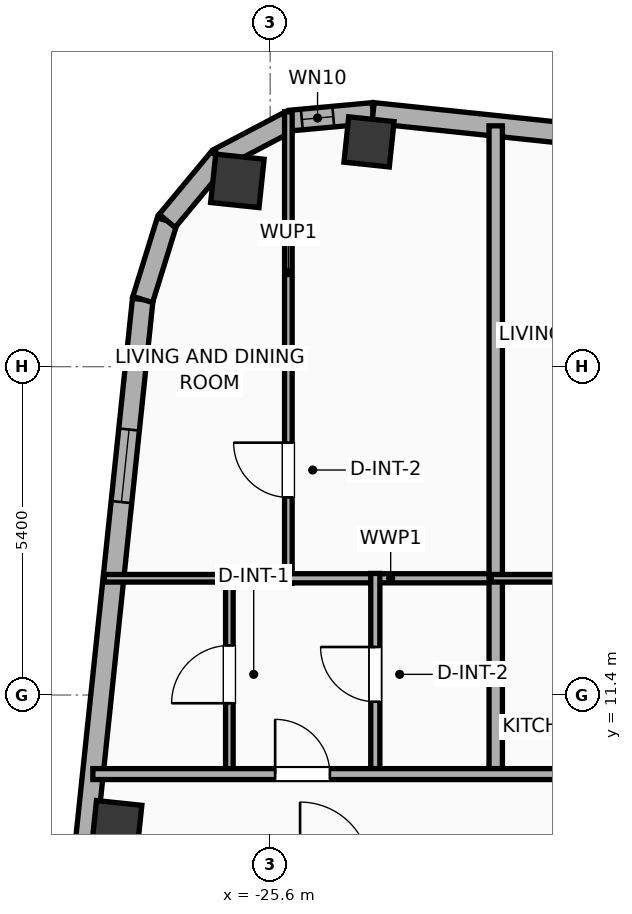
"""IFC4 building model, lengths in metres.
Left out: names, types, materials, properties, quantities, classifications, styles, units other than length and angle.
Written with IfcOpenShell. Run it as: python <this file> out.ifc"""

import sys

from ifc_helpers import new_model, si_unit, direction, frame, frame_2d, origin, origin_2d, place, context, subcontext, project, spatial, rectangle, hollow_rectangle, hollow_circle, extrude, element, fill, save


model = new_model("IFC4")
c1 = context("Model", 3, precision=1e-05, world=origin(), true_north=direction((0.0, 1.0)))
c2 = subcontext(c1, "Body", "Model", "MODEL_VIEW")
j1 = project(units=[si_unit("LENGTHUNIT", "METRE"), si_unit("PLANEANGLEUNIT", "RADIAN")], contexts=[c1])
p1 = place(None, origin())
s1 = spatial("IfcSite", under=j1, at=p1, CompositionType="ELEMENT")
p2 = place(p1, origin())
s2 = spatial("IfcBuilding", under=s1, at=p2, CompositionType="ELEMENT")
p3 = place(p2, frame((0.0, 0.0, 299.0)))
s3 = spatial("IfcBuildingStorey", under=s2, at=p3, CompositionType="ELEMENT", Elevation=299.0)
p4 = place(p3, frame((-23.975, 20.497, 0.0), z_axis=(0.0, 0.0, 1.0), x_axis=(0.994521895368, -0.104528463268, 0.0)))
e1 = element("IfcColumn", 1, at=p4, inside=s3, PredefinedType="COLUMN", context=c2, shape_type="SweptSolid", body=[
    extrude(hollow_rectangle(XDim=0.75, YDim=0.75, WallThickness=0.025, at=origin_2d()), origin(), (0.0, 0.0, 1.0), 3.9),
])
p5 = place(p3, frame((-26.139, 19.855, 0.0), z_axis=(0.0, 0.0, 1.0), x_axis=(0.994521895368, -0.104528463268, 0.0)))
e2 = element("IfcColumn", 2, at=p5, inside=s3, PredefinedType="COLUMN", context=c2, shape_type="SweptSolid", body=[
    extrude(hollow_circle(Radius=0.4, WallThickness=0.028, at=origin_2d()), origin(), (0.0, 0.0, 1.0), 3.9),
])
p6 = place(p3, frame((-28.123, 9.252, 0.0), z_axis=(0.0, 0.0, 1.0), x_axis=(0.994521895368, -0.104528463268, 0.0)))
e3 = element("IfcColumn", 3, at=p6, inside=s3, PredefinedType="COLUMN", context=c2, shape_type="SweptSolid", body=[
    extrude(hollow_rectangle(XDim=0.75, YDim=0.75, WallThickness=0.025, at=origin_2d()), origin(), (0.0, 0.0, 1.0), 3.9),
])
p7 = place(p3, frame((-30.87, -12.296, 0.0), z_axis=(0.0, 0.0, 1.0), x_axis=(0.104533282919, 0.994521388791, 0.0)))
e4 = element("IfcWall", 4, at=p7, inside=s3, PredefinedType="ELEMENTEDWALL", context=c2, shape_type="SweptSolid", body=[
    extrude(rectangle(XDim=30.366, YDim=0.34, at=frame_2d((15.183, 0.0))), origin(), (0.0, 0.0, 1.0), 3.635),
])
p8 = place(p7, frame((5.442, 0.0, 0.65)))
e5 = element("IfcOpeningElement", 5, at=p8, cuts=e4, PredefinedType="OPENING", context=c2, shape_type="SweptSolid", body=[
    extrude(rectangle(XDim=2.6, YDim=2.45, at=frame_2d((1.3, 1.225))), frame((0.0, 0.18, 0.0), z_axis=(0.0, -1.0, 0.0), x_axis=(1.0, 0.0, 0.0)), (0.0, 0.0, 1.0), 0.36),
])
p9 = place(p7, frame((27.017, 0.0, 0.75)))
e6 = element("IfcOpeningElement", 6, at=p9, cuts=e4, PredefinedType="OPENING", context=c2, shape_type="SweptSolid", body=[
    extrude(rectangle(XDim=1.2, YDim=2.05, at=frame_2d((0.6, 1.025))), frame((0.0, 0.18, 0.0), z_axis=(0.0, -1.0, 0.0), x_axis=(1.0, 0.0, 0.0)), (0.0, 0.0, 1.0), 0.36),
])
p10 = place(p7, frame((16.135, 0.0, 0.75)))
e7 = element("IfcOpeningElement", 7, at=p10, cuts=e4, PredefinedType="OPENING", context=c2, shape_type="SweptSolid", body=[
    extrude(rectangle(XDim=1.2, YDim=2.05, at=frame_2d((0.6, 1.025))), frame((0.0, 0.18, 0.0), z_axis=(0.0, -1.0, 0.0), x_axis=(1.0, 0.0, 0.0)), (0.0, 0.0, 1.0), 0.36),
])
p11 = place(p3, frame((-27.696, 17.905, 0.0), z_axis=(0.0, 0.0, 1.0), x_axis=(0.296416228123, 0.955058856671, 0.0)))
e8 = element("IfcWall", 8, at=p11, inside=s3, PredefinedType="ELEMENTEDWALL", context=c2, shape_type="SweptSolid", body=[
    extrude(rectangle(XDim=1.354, YDim=0.34, at=frame_2d((0.677, 0.0))), origin(), (0.0, 0.0, 1.0), 3.635),
])
p12 = place(p3, frame((-27.294, 19.198, 0.0), z_axis=(0.0, 0.0, 1.0), x_axis=(0.639501603217, 0.768789762863, 0.0)))
e9 = element("IfcWall", 9, at=p12, inside=s3, PredefinedType="ELEMENTEDWALL", context=c2, shape_type="SweptSolid", body=[
    extrude(rectangle(XDim=1.337, YDim=0.34, at=frame_2d((0.668, 0.0))), origin(), (0.0, 0.0, 1.0), 3.635),
])
p13 = place(p3, frame((-26.439, 20.226, 0.0), z_axis=(0.0, 0.0, 1.0), x_axis=(0.884922182678, 0.465738908193, 0.0)))
e10 = element("IfcWall", 10, at=p13, inside=s3, PredefinedType="ELEMENTEDWALL", context=c2, shape_type="SweptSolid", body=[
    extrude(rectangle(XDim=1.337, YDim=0.34, at=frame_2d((0.668, 0.0))), origin(), (0.0, 0.0, 1.0), 3.635),
])
p14 = place(p3, frame((-25.256, 20.848, 0.0), z_axis=(0.0, 0.0, 1.0), x_axis=(0.995813013343, 0.091413579172, 0.0)))
e11 = element("IfcWall", 11, at=p14, inside=s3, PredefinedType="ELEMENTEDWALL", context=c2, shape_type="SweptSolid", body=[
    extrude(rectangle(XDim=1.354, YDim=0.34, at=frame_2d((0.677, 0.0))), origin(), (0.0, 0.0, 1.0), 3.635),
])
p15 = place(p14, frame((0.177, 0.0, 0.75)))
e12 = element("IfcOpeningElement", 12, at=p15, cuts=e11, PredefinedType="OPENING", context=c2, shape_type="SweptSolid", body=[
    extrude(rectangle(XDim=0.52, YDim=2.05, at=frame_2d((0.26, 1.025))), frame((0.0, 0.18, 0.0), z_axis=(0.0, -1.0, 0.0), x_axis=(1.0, 0.0, 0.0)), (0.0, 0.0, 1.0), 0.36),
])
p16 = place(p3, frame((-23.908, 20.972, 0.0), z_axis=(0.0, 0.0, 1.0), x_axis=(0.994521888554, -0.104528528102, 0.0)))
e13 = element("IfcWall", 13, at=p16, inside=s3, PredefinedType="ELEMENTEDWALL", context=c2, shape_type="SweptSolid", body=[
    extrude(rectangle(XDim=46.766, YDim=0.34, at=frame_2d((23.383, 0.0))), origin(), (0.0, 0.0, 1.0), 3.635),
])
p17 = place(p16, frame((5.644, 0.0, 0.65)))
e14 = element("IfcOpeningElement", 14, at=p17, cuts=e13, PredefinedType="OPENING", context=c2, shape_type="SweptSolid", body=[
    extrude(rectangle(XDim=2.6, YDim=2.45, at=frame_2d((1.3, 1.225))), frame((0.0, 0.18, 0.0), z_axis=(0.0, -1.0, 0.0), x_axis=(1.0, 0.0, 0.0)), (0.0, 0.0, 1.0), 0.36),
])
p18 = place(p16, frame((3.05, 0.0, 0.75)))
e15 = element("IfcOpeningElement", 15, at=p18, cuts=e13, PredefinedType="OPENING", context=c2, shape_type="SweptSolid", body=[
    extrude(rectangle(XDim=1.2, YDim=2.05, at=frame_2d((0.6, 1.025))), frame((0.0, 0.18, 0.0), z_axis=(0.0, -1.0, 0.0), x_axis=(1.0, 0.0, 0.0)), (0.0, 0.0, 1.0), 0.36),
])
p19 = place(p16, frame((9.957, 0.0, 0.75)))
e16 = element("IfcOpeningElement", 16, at=p19, cuts=e13, PredefinedType="OPENING", context=c2, shape_type="SweptSolid", body=[
    extrude(rectangle(XDim=1.2, YDim=2.05, at=frame_2d((0.6, 1.025))), frame((0.0, 0.18, 0.0), z_axis=(0.0, -1.0, 0.0), x_axis=(1.0, 0.0, 0.0)), (0.0, 0.0, 1.0), 0.36),
])
p20 = place(p16, frame((13.05, 0.0, 0.75)))
e17 = element("IfcOpeningElement", 17, at=p20, cuts=e13, PredefinedType="OPENING", context=c2, shape_type="SweptSolid", body=[
    extrude(rectangle(XDim=1.2, YDim=2.05, at=frame_2d((0.6, 1.025))), frame((0.0, 0.18, 0.0), z_axis=(0.0, -1.0, 0.0), x_axis=(1.0, 0.0, 0.0)), (0.0, 0.0, 1.0), 0.36),
])
p21 = place(p16, frame((16.383, 0.0, 0.75)))
e18 = element("IfcOpeningElement", 18, at=p21, cuts=e13, PredefinedType="OPENING", context=c2, shape_type="SweptSolid", body=[
    extrude(rectangle(XDim=1.2, YDim=2.05, at=frame_2d((0.6, 1.025))), frame((0.0, 0.18, 0.0), z_axis=(0.0, -1.0, 0.0), x_axis=(1.0, 0.0, 0.0)), (0.0, 0.0, 1.0), 0.36),
])
p22 = place(p16, frame((19.716, 0.0, 0.75)))
e19 = element("IfcOpeningElement", 19, at=p22, cuts=e13, PredefinedType="OPENING", context=c2, shape_type="SweptSolid", body=[
    extrude(rectangle(XDim=1.2, YDim=2.05, at=frame_2d((0.6, 1.025))), frame((0.0, 0.18, 0.0), z_axis=(0.0, -1.0, 0.0), x_axis=(1.0, 0.0, 0.0)), (0.0, 0.0, 1.0), 0.36),
])
p23 = place(p16, frame((23.195, 0.0, 0.75)))
e20 = element("IfcOpeningElement", 20, at=p23, cuts=e13, PredefinedType="OPENING", context=c2, shape_type="SweptSolid", body=[
    extrude(rectangle(XDim=1.2, YDim=2.05, at=frame_2d((0.6, 1.025))), frame((0.0, 0.18, 0.0), z_axis=(0.0, -1.0, 0.0), x_axis=(1.0, 0.0, 0.0)), (0.0, 0.0, 1.0), 0.36),
])
p24 = place(p16, frame((26.194, 0.0, 0.75)))
e21 = element("IfcOpeningElement", 21, at=p24, cuts=e13, PredefinedType="OPENING", context=c2, shape_type="SweptSolid", body=[
    extrude(rectangle(XDim=1.2, YDim=2.05, at=frame_2d((0.6, 1.025))), frame((0.0, 0.18, 0.0), z_axis=(0.0, -1.0, 0.0), x_axis=(1.0, 0.0, 0.0)), (0.0, 0.0, 1.0), 0.36),
])
p25 = place(p16, frame((30.152, 0.0, 0.75)))
e22 = element("IfcOpeningElement", 22, at=p25, cuts=e13, PredefinedType="OPENING", context=c2, shape_type="SweptSolid", body=[
    extrude(rectangle(XDim=1.2, YDim=2.05, at=frame_2d((0.6, 1.025))), frame((0.0, 0.18, 0.0), z_axis=(0.0, -1.0, 0.0), x_axis=(1.0, 0.0, 0.0)), (0.0, 0.0, 1.0), 0.36),
])
p26 = place(p16, frame((33.631, 0.0, 0.75)))
e23 = element("IfcOpeningElement", 23, at=p26, cuts=e13, PredefinedType="OPENING", context=c2, shape_type="SweptSolid", body=[
    extrude(rectangle(XDim=1.2, YDim=2.05, at=frame_2d((0.6, 1.025))), frame((0.0, 0.18, 0.0), z_axis=(0.0, -1.0, 0.0), x_axis=(1.0, 0.0, 0.0)), (0.0, 0.0, 1.0), 0.36),
])
p27 = place(p16, frame((38.07, 0.0, 0.75)))
e24 = element("IfcOpeningElement", 24, at=p27, cuts=e13, PredefinedType="OPENING", context=c2, shape_type="SweptSolid", body=[
    extrude(rectangle(XDim=1.2, YDim=2.05, at=frame_2d((0.6, 1.025))), frame((0.0, 0.18, 0.0), z_axis=(0.0, -1.0, 0.0), x_axis=(1.0, 0.0, 0.0)), (0.0, 0.0, 1.0), 0.36),
])
p28 = place(p16, frame((40.589, 0.0, 0.75)))
e25 = element("IfcOpeningElement", 25, at=p28, cuts=e13, PredefinedType="OPENING", context=c2, shape_type="SweptSolid", body=[
    extrude(rectangle(XDim=1.2, YDim=2.05, at=frame_2d((0.6, 1.025))), frame((0.0, 0.18, 0.0), z_axis=(0.0, -1.0, 0.0), x_axis=(1.0, 0.0, 0.0)), (0.0, 0.0, 1.0), 0.36),
])
p29 = place(p16, frame((43.789, 0.0, 0.75)))
e26 = element("IfcOpeningElement", 26, at=p29, cuts=e13, PredefinedType="OPENING", context=c2, shape_type="SweptSolid", body=[
    extrude(rectangle(XDim=1.2, YDim=2.05, at=frame_2d((0.6, 1.025))), frame((0.0, 0.18, 0.0), z_axis=(0.0, -1.0, 0.0), x_axis=(1.0, 0.0, 0.0)), (0.0, 0.0, 1.0), 0.36),
])
p30 = place(p3, frame((-25.301, 13.24, 0.0), z_axis=(0.0, 0.0, 1.0), x_axis=(0.0, 1.0, 0.0)))
e27 = element("IfcWall", 27, at=p30, inside=s3, PredefinedType="PARTITIONING", context=c2, shape_type="SweptSolid", body=[
    extrude(rectangle(XDim=7.751, YDim=0.125, at=frame_2d((3.875, 0.0))), origin(), (0.0, 0.0, 1.0), 3.635),
])
p31 = place(p30, frame((1.41, 0.0, 0.0)))
e28 = element("IfcOpeningElement", 28, at=p31, cuts=e27, PredefinedType="OPENING", context=c2, shape_type="SweptSolid", body=[
    extrude(rectangle(XDim=0.9, YDim=2.05, at=frame_2d((0.45, 1.025))), frame((0.0, 0.073, 0.0), z_axis=(0.0, -1.0, 0.0), x_axis=(1.0, 0.0, 0.0)), (0.0, 0.0, 1.0), 0.145),
])
p32 = place(p3, frame((-25.421, 13.32, 0.0), z_axis=(0.0, 0.0, 1.0), x_axis=(1.0, 0.0, 0.0)))
e29 = element("IfcWall", 29, at=p32, inside=s3, PredefinedType="PLUMBINGWALL", context=c2, shape_type="SweptSolid", body=[
    extrude(rectangle(XDim=3.605, YDim=0.15, at=frame_2d((1.802, 0.0))), origin(), (0.0, 0.0, 1.0), 3.635),
])
p33 = place(p3, frame((-26.271, 10.08, 0.0), z_axis=(0.0, 0.0, 1.0), x_axis=(0.0, 1.0, 0.0)))
e30 = element("IfcWall", 30, at=p33, inside=s3, PredefinedType="PARTITIONING", context=c2, shape_type="SweptSolid", body=[
    extrude(rectangle(XDim=3.32, YDim=0.125, at=frame_2d((1.66, 0.0))), origin(), (0.0, 0.0, 1.0), 3.635),
])
p34 = place(p33, frame((1.185, 0.0, 0.0)))
e31 = element("IfcOpeningElement", 31, at=p34, cuts=e30, PredefinedType="OPENING", context=c2, shape_type="SweptSolid", body=[
    extrude(rectangle(XDim=0.95, YDim=2.05, at=frame_2d((0.475, 1.025))), frame((0.0, 0.073, 0.0), z_axis=(0.0, -1.0, 0.0), x_axis=(1.0, 0.0, 0.0)), (0.0, 0.0, 1.0), 0.145),
])
p35 = place(p3, frame((-28.329, 13.32, 0.0), z_axis=(0.0, 0.0, 1.0), x_axis=(1.0, 0.0, 0.0)))
e32 = element("IfcWall", 32, at=p35, inside=s3, PredefinedType="PARTITIONING", context=c2, shape_type="SweptSolid", body=[
    extrude(rectangle(XDim=2.178, YDim=0.125, at=frame_2d((1.089, 0.0))), origin(), (0.0, 0.0, 1.0), 3.635),
])
p36 = place(p3, frame((-23.871, 10.08, 0.0), z_axis=(0.0, 0.0, 1.0), x_axis=(0.0, 1.0, 0.0)))
e33 = element("IfcWall", 33, at=p36, inside=s3, PredefinedType="PLUMBINGWALL", context=c2, shape_type="SweptSolid", body=[
    extrude(rectangle(XDim=3.32, YDim=0.15, at=frame_2d((1.66, 0.0))), origin(), (0.0, 0.0, 1.0), 3.635),
])
p37 = place(p36, frame((1.21, 0.0, 0.0)))
e34 = element("IfcOpeningElement", 34, at=p37, cuts=e33, PredefinedType="OPENING", context=c2, shape_type="SweptSolid", body=[
    extrude(rectangle(XDim=0.9, YDim=2.05, at=frame_2d((0.45, 1.025))), frame((0.0, 0.085, 0.0), z_axis=(0.0, -1.0, 0.0), x_axis=(1.0, 0.0, 0.0)), (0.0, 0.0, 1.0), 0.17),
])
p38 = place(p3, frame((-21.891, 10.02, 0.0), z_axis=(0.0, 0.0, 1.0), x_axis=(0.0, 1.0, 0.0)))
e35 = element("IfcWall", 35, at=p38, inside=s3, PredefinedType="PARTITIONING", context=c2, shape_type="SweptSolid", body=[
    extrude(rectangle(XDim=10.74, YDim=0.22, at=frame_2d((5.37, 0.0))), origin(), (0.0, 0.0, 1.0), 3.075),
])
p39 = place(p3, frame((-21.966, 13.32, 0.0), z_axis=(0.0, 0.0, 1.0), x_axis=(1.0, 0.0, 0.0)))
e36 = element("IfcWall", 36, at=p39, inside=s3, PredefinedType="PARTITIONING", context=c2, shape_type="SweptSolid", body=[
    extrude(rectangle(XDim=2.505, YDim=0.125, at=frame_2d((1.252, 0.0))), origin(), (0.0, 0.0, 1.0), 3.635),
])
p40 = place(p3, frame((-28.516, 10.1, 0.0), z_axis=(0.0, 0.0, 1.0), x_axis=(1.0, 0.0, 0.0)))
e37 = element("IfcWall", 37, at=p40, inside=s3, PredefinedType="PARTITIONING", context=c2, shape_type="SweptSolid", body=[
    extrude(rectangle(XDim=53.955, YDim=0.18, at=frame_2d((26.978, 0.0))), origin(), (0.0, 0.0, 1.0), 3.635),
])
p41 = place(p40, frame((2.998, 0.0, 0.0)))
e38 = element("IfcOpeningElement", 38, at=p41, cuts=e37, PredefinedType="OPENING", context=c2, shape_type="SweptSolid", body=[
    extrude(rectangle(XDim=0.9, YDim=2.05, at=frame_2d((0.45, 1.025))), frame((0.0, 0.1, 0.0), z_axis=(0.0, -1.0, 0.0), x_axis=(1.0, 0.0, 0.0)), (0.0, 0.0, 1.0), 0.2),
])
p42 = place(p40, frame((9.656, 0.0, 0.0)))
e39 = element("IfcOpeningElement", 39, at=p42, cuts=e37, PredefinedType="OPENING", context=c2, shape_type="SweptSolid", body=[
    extrude(rectangle(XDim=0.9, YDim=2.05, at=frame_2d((0.45, 1.025))), frame((0.0, 0.1, 0.0), z_axis=(0.0, -1.0, 0.0), x_axis=(1.0, 0.0, 0.0)), (0.0, 0.0, 1.0), 0.2),
])
p43 = place(p40, frame((16.287, 0.0, 0.0)))
e40 = element("IfcOpeningElement", 40, at=p43, cuts=e37, PredefinedType="OPENING", context=c2, shape_type="SweptSolid", body=[
    extrude(rectangle(XDim=0.9, YDim=2.05, at=frame_2d((0.45, 1.025))), frame((0.0, 0.1, 0.0), z_axis=(0.0, -1.0, 0.0), x_axis=(1.0, 0.0, 0.0)), (0.0, 0.0, 1.0), 0.2),
])
p44 = place(p40, frame((22.918, 0.0, 0.0)))
e41 = element("IfcOpeningElement", 41, at=p44, cuts=e37, PredefinedType="OPENING", context=c2, shape_type="SweptSolid", body=[
    extrude(rectangle(XDim=0.9, YDim=2.05, at=frame_2d((0.45, 1.025))), frame((0.0, 0.1, 0.0), z_axis=(0.0, -1.0, 0.0), x_axis=(1.0, 0.0, 0.0)), (0.0, 0.0, 1.0), 0.2),
])
p45 = place(p40, frame((29.689, 0.0, 0.0)))
e42 = element("IfcOpeningElement", 42, at=p45, cuts=e37, PredefinedType="OPENING", context=c2, shape_type="SweptSolid", body=[
    extrude(rectangle(XDim=0.9, YDim=2.05, at=frame_2d((0.45, 1.025))), frame((0.0, 0.1, 0.0), z_axis=(0.0, -1.0, 0.0), x_axis=(1.0, 0.0, 0.0)), (0.0, 0.0, 1.0), 0.2),
])
p46 = place(p40, frame((36.612, 0.0, 0.0)))
e43 = element("IfcOpeningElement", 43, at=p46, cuts=e37, PredefinedType="OPENING", context=c2, shape_type="SweptSolid", body=[
    extrude(rectangle(XDim=0.9, YDim=2.05, at=frame_2d((0.45, 1.025))), frame((0.0, 0.1, 0.0), z_axis=(0.0, -1.0, 0.0), x_axis=(1.0, 0.0, 0.0)), (0.0, 0.0, 1.0), 0.2),
])
p47 = place(p40, frame((43.529, 0.0, 0.0)))
e44 = element("IfcOpeningElement", 44, at=p47, cuts=e37, PredefinedType="OPENING", context=c2, shape_type="SweptSolid", body=[
    extrude(rectangle(XDim=0.9, YDim=2.05, at=frame_2d((0.45, 1.025))), frame((0.0, 0.1, 0.0), z_axis=(0.0, -1.0, 0.0), x_axis=(1.0, 0.0, 0.0)), (0.0, 0.0, 1.0), 0.2),
])
p48 = place(p40, frame((50.452, 0.0, 0.0)))
e45 = element("IfcOpeningElement", 45, at=p48, cuts=e37, PredefinedType="OPENING", context=c2, shape_type="SweptSolid", body=[
    extrude(rectangle(XDim=0.9, YDim=2.05, at=frame_2d((0.45, 1.025))), frame((0.0, 0.1, 0.0), z_axis=(0.0, -1.0, 0.0), x_axis=(1.0, 0.0, 0.0)), (0.0, 0.0, 1.0), 0.2),
])
p49 = place(p9, origin())
e46 = element("IfcWindow", 46, at=p49, inside=s3, PartitioningType="SINGLE_PANEL", PredefinedType="WINDOW", context=c2, shape_type="SweptSolid", body=[
    extrude(rectangle(XDim=1.2, YDim=2.05, at=frame_2d((0.6, 1.025))), frame((0.0, 0.03, 0.0), z_axis=(0.0, -1.0, 0.0), x_axis=(1.0, 0.0, 0.0)), (0.0, 0.0, 1.0), 0.06),
])
fill(e6, e46)
p50 = place(p15, origin())
e47 = element("IfcWindow", 47, at=p50, inside=s3, PartitioningType="SINGLE_PANEL", PredefinedType="WINDOW", context=c2, shape_type="SweptSolid", body=[
    extrude(rectangle(XDim=0.52, YDim=2.05, at=frame_2d((0.26, 1.025))), frame((0.0, 0.03, 0.0), z_axis=(0.0, -1.0, 0.0), x_axis=(1.0, 0.0, 0.0)), (0.0, 0.0, 1.0), 0.06),
])
fill(e12, e47)
p51 = place(p31, origin())
e48 = element("IfcDoor", 48, at=p51, inside=s3, OperationType="SINGLE_SWING_RIGHT", PredefinedType="DOOR", context=c2, shape_type="SweptSolid", body=[
    extrude(rectangle(XDim=0.9, YDim=2.05, at=frame_2d((0.45, 1.025))), frame((0.0, 0.025, 0.0), z_axis=(0.0, -1.0, 0.0), x_axis=(1.0, 0.0, 0.0)), (0.0, 0.0, 1.0), 0.05),
])
fill(e28, e48)
p52 = place(p34, origin())
e49 = element("IfcDoor", 49, at=p52, inside=s3, OperationType="SINGLE_SWING_LEFT", PredefinedType="DOOR", context=c2, shape_type="SweptSolid", body=[
    extrude(rectangle(XDim=0.95, YDim=2.05, at=frame_2d((0.475, 1.025))), frame((0.0, 0.025, 0.0), z_axis=(0.0, -1.0, 0.0), x_axis=(1.0, 0.0, 0.0)), (0.0, 0.0, 1.0), 0.05),
])
fill(e31, e49)
p53 = place(p37, origin())
e50 = element("IfcDoor", 50, at=p53, inside=s3, OperationType="SINGLE_SWING_RIGHT", PredefinedType="DOOR", context=c2, shape_type="SweptSolid", body=[
    extrude(rectangle(XDim=0.9, YDim=2.05, at=frame_2d((0.45, 1.025))), frame((0.0, 0.025, 0.0), z_axis=(0.0, -1.0, 0.0), x_axis=(1.0, 0.0, 0.0)), (0.0, 0.0, 1.0), 0.05),
])
fill(e34, e50)
p54 = place(p41, origin())
e51 = element("IfcDoor", 51, at=p54, inside=s3, OperationType="SINGLE_SWING_LEFT", PredefinedType="DOOR", context=c2, shape_type="SweptSolid", body=[
    extrude(rectangle(XDim=0.9, YDim=2.05, at=frame_2d((0.45, 1.025))), frame((0.0, 0.025, 0.0), z_axis=(0.0, -1.0, 0.0), x_axis=(1.0, 0.0, 0.0)), (0.0, 0.0, 1.0), 0.05),
])
fill(e38, e51)
save(model, sys.argv[1])
